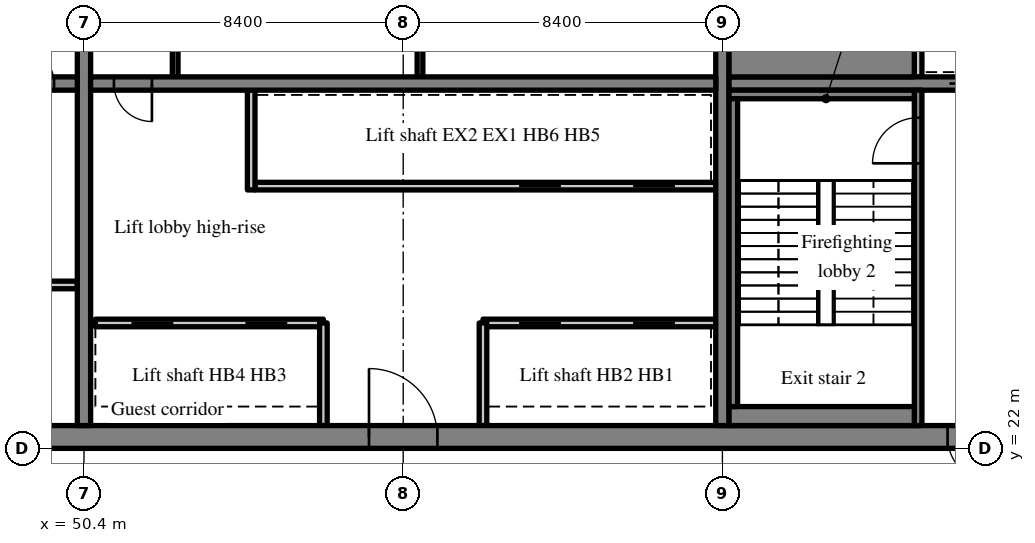
"""IFC4 building model, lengths in metres.
Left out: names, types, materials, properties, quantities, classifications, styles, units other than length and angle.
Written with IfcOpenShell. Run it as: python <this file> out.ifc"""

import sys

from ifc_helpers import new_model, si_unit, direction, frame, frame_2d, origin, place, context, subcontext, project, spatial, rectangle, extrude, source, transform, mapped, element, fill, save


model = new_model("IFC4")
c1 = context("Model", 3, precision=1e-05, world=origin(), true_north=direction((0.0, 1.0)))
c2 = subcontext(c1, "Body", "Model", "MODEL_VIEW")
j1 = project(units=[si_unit("LENGTHUNIT", "METRE"), si_unit("PLANEANGLEUNIT", "RADIAN")], contexts=[c1])
p1 = place(None, origin())
s1 = spatial("IfcSite", under=j1, at=p1, CompositionType="ELEMENT")
p2 = place(p1, origin())
s2 = spatial("IfcBuilding", under=s1, at=p2, CompositionType="ELEMENT")
p3 = place(p2, frame((0.0, 0.0, 256.9)))
s3 = spatial("IfcBuildingStorey", under=s2, at=p3, CompositionType="ELEMENT", Elevation=256.9)
m1 = source(origin(), c2, "Body", "SweptSolid", [
    extrude(rectangle(XDim=50.4, YDim=0.6, at=frame_2d((25.2, 0.0))), origin(), (0.0, 0.0, 1.0), 3.62),
])
p4 = place(p3, frame((25.2, 22.3, 0.0), z_axis=(0.0, 0.0, 1.0), x_axis=(1.0, 0.0, 0.0)))
e1 = element("IfcWall", 1, at=p4, inside=s3, PredefinedType="SHEAR", context=c2, shape_type="MappedRepresentation", body=[
    mapped(m1, transform((0.0, 0.0, 0.0), scale=1.0)),
])
m2 = source(origin(), c2, "Body", "SweptSolid", [
    extrude(rectangle(XDim=1.8, YDim=2.1, at=frame_2d((0.9, 1.05))), frame((0.0, 0.31, 0.0), z_axis=(0.0, -1.0, 0.0), x_axis=(1.0, 0.0, 0.0)), (0.0, 0.0, 1.0), 0.62),
])
p5 = place(p4, frame((15.9, 0.0, 0.0)))
e2 = element("IfcOpeningElement", 2, at=p5, cuts=e1, PredefinedType="OPENING", context=c2, shape_type="MappedRepresentation", body=[
    mapped(m2, transform((0.0, 0.0, 0.0), scale=1.0)),
])
m3 = source(origin(), c2, "Body", "SweptSolid", [
    extrude(rectangle(XDim=0.9, YDim=2.1, at=frame_2d((0.45, 1.05))), frame((0.0, 0.31, 0.0), z_axis=(0.0, -1.0, 0.0), x_axis=(1.0, 0.0, 0.0)), (0.0, 0.0, 1.0), 0.62),
])
p6 = place(p4, frame((21.513, 0.0, 0.0)))
e3 = element("IfcOpeningElement", 3, at=p6, cuts=e1, PredefinedType="OPENING", context=c2, shape_type="MappedRepresentation", body=[
    mapped(m3, transform((0.0, 0.0, 0.0), scale=1.0)),
])
p7 = place(p4, frame((32.7, 0.0, 0.0)))
e4 = element("IfcOpeningElement", 4, at=p7, cuts=e1, PredefinedType="OPENING", context=c2, shape_type="MappedRepresentation", body=[
    mapped(m2, transform((0.0, 0.0, 0.0), scale=1.0)),
])
m4 = source(origin(), c2, "Body", "SweptSolid", [
    extrude(rectangle(XDim=1.2, YDim=2.1, at=frame_2d((0.6, 1.05))), frame((0.0, 0.31, 0.0), z_axis=(0.0, -1.0, 0.0), x_axis=(1.0, 0.0, 0.0)), (0.0, 0.0, 1.0), 0.62),
])
p8 = place(p4, frame((6.488, 0.0, 0.0)))
e5 = element("IfcOpeningElement", 5, at=p8, cuts=e1, PredefinedType="OPENING", context=c2, shape_type="MappedRepresentation", body=[
    mapped(m4, transform((0.0, 0.0, 0.0), scale=1.0)),
])
p9 = place(p4, frame((47.925, 0.0, 0.0)))
e6 = element("IfcOpeningElement", 6, at=p9, cuts=e1, PredefinedType="OPENING", context=c2, shape_type="MappedRepresentation", body=[
    mapped(m4, transform((0.0, 0.0, 0.0), scale=1.0)),
])
m5 = source(origin(), c2, "Body", "SweptSolid", [
    extrude(rectangle(XDim=18.8, YDim=0.35, at=frame_2d((9.4, 0.0))), origin(), (0.0, 0.0, 1.0), 3.62),
])
p10 = place(p3, frame((50.4, 22.6, 0.0), z_axis=(0.0, 0.0, 1.0), x_axis=(0.0, 1.0, 0.0)))
e7 = element("IfcWall", 7, at=p10, inside=s3, PredefinedType="SHEAR", context=c2, shape_type="MappedRepresentation", body=[
    mapped(m5, transform((0.0, 0.0, 0.0), scale=1.0)),
])
m6 = source(origin(), c2, "Body", "SweptSolid", [
    extrude(rectangle(XDim=1.1, YDim=2.1, at=frame_2d((0.55, 1.05))), frame((0.0, 0.185, 0.0), z_axis=(0.0, -1.0, 0.0), x_axis=(1.0, 0.0, 0.0)), (0.0, 0.0, 1.0), 0.37),
])
p11 = place(p10, frame((12.85, 0.0, 0.0)))
e8 = element("IfcOpeningElement", 8, at=p11, cuts=e7, PredefinedType="OPENING", context=c2, shape_type="MappedRepresentation", body=[
    mapped(m6, transform((0.0, 0.0, 0.0), scale=1.0)),
])
p12 = place(p3, frame((67.2, 22.6, 0.0), z_axis=(0.0, 0.0, 1.0), x_axis=(0.0, 1.0, 0.0)))
e9 = element("IfcWall", 9, at=p12, inside=s3, PredefinedType="SHEAR", context=c2, shape_type="MappedRepresentation", body=[
    mapped(m5, transform((0.0, 0.0, 0.0), scale=1.0)),
])
m7 = source(origin(), c2, "Body", "SweptSolid", [
    extrude(rectangle(XDim=16.45, YDim=0.35, at=frame_2d((8.225, 0.0))), origin(), (0.0, 0.0, 1.0), 3.62),
])
p13 = place(p3, frame((33.775, 31.6, 0.0), z_axis=(0.0, 0.0, 1.0), x_axis=(1.0, 0.0, 0.0)))
e10 = element("IfcWall", 10, at=p13, inside=s3, PredefinedType="SHEAR", context=c2, shape_type="MappedRepresentation", body=[
    mapped(m7, transform((0.0, 0.0, 0.0), scale=1.0)),
])
m8 = source(origin(), c2, "Body", "SweptSolid", [
    extrude(rectangle(XDim=1.0, YDim=2.1, at=frame_2d((0.5, 1.05))), frame((0.0, 0.185, 0.0), z_axis=(0.0, -1.0, 0.0), x_axis=(1.0, 0.0, 0.0)), (0.0, 0.0, 1.0), 0.37),
])
p14 = place(p13, frame((14.837, 0.0, 0.0)))
e11 = element("IfcOpeningElement", 11, at=p14, cuts=e10, PredefinedType="OPENING", context=c2, shape_type="MappedRepresentation", body=[
    mapped(m8, transform((0.0, 0.0, 0.0), scale=1.0)),
])
m9 = source(origin(), c2, "Body", "SweptSolid", [
    extrude(rectangle(XDim=16.45, YDim=0.35, at=frame_2d((8.225, 0.0))), origin(), (0.0, 0.0, 1.0), 3.62),
])
p15 = place(p3, frame((50.575, 31.6, 0.0), z_axis=(0.0, 0.0, 1.0), x_axis=(1.0, 0.0, 0.0)))
e12 = element("IfcWall", 12, at=p15, inside=s3, PredefinedType="SHEAR", context=c2, shape_type="MappedRepresentation", body=[
    mapped(m9, transform((0.0, 0.0, 0.0), scale=1.0)),
])
p16 = place(p15, frame((0.613, 0.0, 0.0)))
e13 = element("IfcOpeningElement", 13, at=p16, cuts=e12, PredefinedType="OPENING", context=c2, shape_type="MappedRepresentation", body=[
    mapped(m8, transform((0.0, 0.0, 0.0), scale=1.0)),
])
m10 = source(origin(), c2, "Body", "SweptSolid", [
    extrude(rectangle(XDim=7.625, YDim=0.35, at=frame_2d((3.812, 0.0))), origin(), (0.0, 0.0, 1.0), 3.62),
])
p17 = place(p3, frame((67.375, 31.6, 0.0), z_axis=(0.0, 0.0, 1.0), x_axis=(1.0, 0.0, 0.0)))
e14 = element("IfcWall", 14, at=p17, inside=s3, PredefinedType="SHEAR", context=c2, shape_type="MappedRepresentation", body=[
    mapped(m10, transform((0.0, 0.0, 0.0), scale=1.0)),
])
p18 = place(p17, frame((5.8, 0.0, 0.0)))
e15 = element("IfcOpeningElement", 15, at=p18, cuts=e14, PredefinedType="OPENING", context=c2, shape_type="MappedRepresentation", body=[
    mapped(m6, transform((0.0, 0.0, 0.0), scale=1.0)),
])
m11 = source(origin(), c2, "Body", "SweptSolid", [
    extrude(rectangle(XDim=6.125, YDim=0.2, at=frame_2d((3.062, 0.0))), origin(), (0.0, 0.0, 1.0), 3.62),
])
p19 = place(p3, frame((44.1, 26.3, 0.0), z_axis=(0.0, 0.0, 1.0), x_axis=(1.0, 0.0, 0.0)))
e16 = element("IfcWall", 16, at=p19, inside=s3, PredefinedType="PARTITIONING", context=c2, shape_type="MappedRepresentation", body=[
    mapped(m11, transform((0.0, 0.0, 0.0), scale=1.0)),
])
p20 = place(p3, frame((67.025, 25.3, 0.0), z_axis=(0.0, 0.0, 1.0), x_axis=(-1.0, 0.0, 0.0)))
e17 = element("IfcWall", 17, at=p20, inside=s3, PredefinedType="SOLIDWALL", context=c2, shape_type="MappedRepresentation", body=[
    mapped(m11, transform((0.0, 0.0, 0.0), scale=1.0)),
])
m12 = source(origin(), c2, "Body", "SweptSolid", [
    extrude(rectangle(XDim=1.1, YDim=2.1, at=frame_2d((0.55, 1.05))), frame((0.0, 0.11, 0.0), z_axis=(0.0, -1.0, 0.0), x_axis=(1.0, 0.0, 0.0)), (0.0, 0.0, 1.0), 0.22),
])
p21 = place(p20, frame((1.075, 0.0, 0.0)))
e18 = element("IfcOpeningElement", 18, at=p21, cuts=e17, PredefinedType="OPENING", context=c2, shape_type="MappedRepresentation", body=[
    mapped(m12, transform((0.0, 0.0, 0.0), scale=1.0)),
])
p22 = place(p20, frame((4.075, 0.0, 0.0)))
e19 = element("IfcOpeningElement", 19, at=p22, cuts=e17, PredefinedType="OPENING", context=c2, shape_type="MappedRepresentation", body=[
    mapped(m12, transform((0.0, 0.0, 0.0), scale=1.0)),
])
m13 = source(origin(), c2, "Body", "SweptSolid", [
    extrude(rectangle(XDim=6.0, YDim=0.2, at=frame_2d((3.0, 0.0))), origin(), (0.0, 0.0, 1.0), 3.62),
])
p23 = place(p3, frame((56.7, 25.3, 0.0), z_axis=(0.0, 0.0, 1.0), x_axis=(-1.0, 0.0, 0.0)))
e20 = element("IfcWall", 20, at=p23, inside=s3, PredefinedType="SOLIDWALL", context=c2, shape_type="MappedRepresentation", body=[
    mapped(m13, transform((0.0, 0.0, 0.0), scale=1.0)),
])
p24 = place(p23, frame((0.95, 0.0, 0.0)))
e21 = element("IfcOpeningElement", 21, at=p24, cuts=e20, PredefinedType="OPENING", context=c2, shape_type="MappedRepresentation", body=[
    mapped(m12, transform((0.0, 0.0, 0.0), scale=1.0)),
])
p25 = place(p23, frame((3.95, 0.0, 0.0)))
e22 = element("IfcOpeningElement", 22, at=p25, cuts=e20, PredefinedType="OPENING", context=c2, shape_type="MappedRepresentation", body=[
    mapped(m12, transform((0.0, 0.0, 0.0), scale=1.0)),
])
m14 = source(origin(), c2, "Body", "SweptSolid", [
    extrude(rectangle(XDim=12.125, YDim=0.2, at=frame_2d((6.062, 0.0))), origin(), (0.0, 0.0, 1.0), 3.62),
])
p26 = place(p3, frame((67.025, 28.9, 0.0), z_axis=(0.0, 0.0, 1.0), x_axis=(-1.0, 0.0, 0.0)))
e23 = element("IfcWall", 23, at=p26, inside=s3, PredefinedType="SOLIDWALL", context=c2, shape_type="MappedRepresentation", body=[
    mapped(m14, transform((0.0, 0.0, 0.0), scale=1.0)),
])
p27 = place(p26, frame((1.075, 0.0, 0.0)))
e24 = element("IfcOpeningElement", 24, at=p27, cuts=e23, PredefinedType="OPENING", context=c2, shape_type="MappedRepresentation", body=[
    mapped(m12, transform((0.0, 0.0, 0.0), scale=1.0)),
])
p28 = place(p26, frame((4.075, 0.0, 0.0)))
e25 = element("IfcOpeningElement", 25, at=p28, cuts=e23, PredefinedType="OPENING", context=c2, shape_type="MappedRepresentation", body=[
    mapped(m12, transform((0.0, 0.0, 0.0), scale=1.0)),
])
m15 = source(origin(), c2, "Body", "SweptSolid", [
    extrude(rectangle(XDim=2.7, YDim=0.2, at=frame_2d((1.35, 0.0))), origin(), (0.0, 0.0, 1.0), 3.62),
])
for number, where, z_axis, x_axis in (
    (26, (60.9, 22.6, 0.0), (0.0, 0.0, 1.0), (0.0, 1.0, 0.0)),
    (27, (56.7, 22.6, 0.0), (0.0, 0.0, 1.0), (0.0, 1.0, 0.0)),
):
    element("IfcWall", number, at=place(p3, frame(where, z_axis=z_axis, x_axis=x_axis)), inside=s3, PredefinedType="SOLIDWALL", context=c2, shape_type="MappedRepresentation", body=[
        mapped(m15, transform((0.0, 0.0, 0.0), scale=1.0)),
    ])
m16 = source(origin(), c2, "Body", "SweptSolid", [
    extrude(rectangle(XDim=2.625, YDim=0.2, at=frame_2d((1.312, 0.0))), origin(), (0.0, 0.0, 1.0), 3.62),
])
p29 = place(p3, frame((54.8, 28.8, 0.0), z_axis=(0.0, 0.0, 1.0), x_axis=(0.0, 1.0, 0.0)))
e28 = element("IfcWall", 28, at=p29, inside=s3, PredefinedType="SOLIDWALL", context=c2, shape_type="MappedRepresentation", body=[
    mapped(m16, transform((0.0, 0.0, 0.0), scale=1.0)),
])
m17 = source(origin(), c2, "Body", "SweptSolid", [
    extrude(rectangle(XDim=3.225, YDim=0.15, at=frame_2d((1.613, 0.0))), origin(), (0.0, 0.0, 1.0), 3.62),
])
for number, where, z_axis, x_axis in (
    (29, (52.8, 31.775, 0.0), (0.0, 0.0, 1.0), (0.0, 1.0, 0.0)),
    (30, (59.242, 31.775, 0.0), (0.0, 0.0, 1.0), (0.0, 1.0, 0.0)),
):
    element("IfcWall", number, at=place(p3, frame(where, z_axis=z_axis, x_axis=x_axis)), inside=s3, PredefinedType="PARTITIONING", context=c2, shape_type="MappedRepresentation", body=[
        mapped(m17, transform((0.0, 0.0, 0.0), scale=1.0)),
    ])
m18 = source(origin(), c2, "Body", "SweptSolid", [
    extrude(rectangle(XDim=8.825, YDim=0.2, at=frame_2d((4.413, 0.0))), origin(), (0.0, 0.0, 1.0), 3.62),
])
p30 = place(p3, frame((72.35, 22.6, 0.0), z_axis=(0.0, 0.0, 1.0), x_axis=(0.0, 1.0, 0.0)))
e31 = element("IfcWall", 31, at=p30, inside=s3, PredefinedType="SOLIDWALL", context=c2, shape_type="MappedRepresentation", body=[
    mapped(m18, transform((0.0, 0.0, 0.0), scale=1.0)),
])
m19 = source(origin(), c2, "Body", "SweptSolid", [
    extrude(rectangle(XDim=1.2, YDim=2.1, at=frame_2d((0.6, 1.05))), frame((0.0, 0.11, 0.0), z_axis=(0.0, -1.0, 0.0), x_axis=(1.0, 0.0, 0.0)), (0.0, 0.0, 1.0), 0.22),
])
p31 = place(p30, frame((6.9, 0.0, 0.0)))
e32 = element("IfcOpeningElement", 32, at=p31, cuts=e31, PredefinedType="OPENING", context=c2, shape_type="MappedRepresentation", body=[
    mapped(m19, transform((0.0, 0.0, 0.0), scale=1.0)),
])
m20 = source(origin(), c2, "Body", "SweptSolid", [
    extrude(rectangle(XDim=1.825, YDim=0.2, at=frame_2d((0.913, 0.0))), origin(), (0.0, 0.0, 1.0), 3.62),
])
p32 = place(p3, frame((72.35, 31.775, 0.0), z_axis=(0.0, 0.0, 1.0), x_axis=(0.0, 1.0, 0.0)))
e33 = element("IfcWall", 33, at=p32, inside=s3, PredefinedType="SOLIDWALL", context=c2, shape_type="MappedRepresentation", body=[
    mapped(m20, transform((0.0, 0.0, 0.0), scale=1.0)),
])
m21 = source(origin(), c2, "Body", "SweptSolid", [
    extrude(rectangle(XDim=4.875, YDim=0.5, at=frame_2d((2.438, 0.0))), origin(), (0.0, 0.0, 1.0), 3.62),
])
p33 = place(p3, frame((67.375, 22.85, 0.0), z_axis=(0.0, 0.0, 1.0), x_axis=(1.0, 0.0, 0.0)))
e34 = element("IfcWall", 34, at=p33, inside=s3, PredefinedType="SOLIDWALL", context=c2, shape_type="MappedRepresentation", body=[
    mapped(m21, transform((0.0, 0.0, 0.0), scale=1.0)),
])
m22 = source(origin(), c2, "Body", "SweptSolid", [
    extrude(rectangle(XDim=4.875, YDim=0.225, at=frame_2d((2.438, 0.0))), origin(), (0.0, 0.0, 1.0), 3.62),
])
p34 = place(p3, frame((67.375, 31.312, 0.0), z_axis=(0.0, 0.0, 1.0), x_axis=(1.0, 0.0, 0.0)))
e35 = element("IfcWall", 35, at=p34, inside=s3, PredefinedType="SOLIDWALL", context=c2, shape_type="MappedRepresentation", body=[
    mapped(m22, transform((0.0, 0.0, 0.0), scale=1.0)),
])
m23 = source(origin(), c2, "Body", "SweptSolid", [
    extrude(rectangle(XDim=8.1, YDim=0.225, at=frame_2d((4.05, 0.0))), origin(), (0.0, 0.0, 1.0), 3.62),
])
p35 = place(p3, frame((67.487, 23.1, 0.0), z_axis=(0.0, 0.0, 1.0), x_axis=(0.0, 1.0, 0.0)))
e36 = element("IfcWall", 36, at=p35, inside=s3, PredefinedType="SOLIDWALL", context=c2, shape_type="MappedRepresentation", body=[
    mapped(m23, transform((0.0, 0.0, 0.0), scale=1.0)),
])
m24 = source(origin(), c2, "Body", "SweptSolid", [
    extrude(rectangle(XDim=4.875, YDim=1.025, at=frame_2d((2.438, 0.0))), origin(), (0.0, 0.0, 1.0), 3.62),
])
p36 = place(p3, frame((67.375, 32.287, 0.0), z_axis=(0.0, 0.0, 1.0), x_axis=(1.0, 0.0, 0.0)))
e37 = element("IfcWall", 37, at=p36, inside=s3, PredefinedType="SOLIDWALL", context=c2, shape_type="MappedRepresentation", body=[
    mapped(m24, transform((0.0, 0.0, 0.0), scale=1.0)),
])
m25 = source(origin(), c2, "Body", "SweptSolid", [
    extrude(rectangle(XDim=1.0, YDim=2.1, at=frame_2d((0.5, 1.05))), frame((0.0, 0.025, 0.0), z_axis=(0.0, -1.0, 0.0), x_axis=(1.0, 0.0, 0.0)), (0.0, 0.0, 1.0), 0.05),
])
p37 = place(p14, origin())
e38 = element("IfcDoor", 38, at=p37, inside=s3, OperationType="SINGLE_SWING_LEFT", PredefinedType="DOOR", context=c2, shape_type="MappedRepresentation", body=[
    mapped(m25, transform((0.0, 0.0, 0.0), scale=1.0)),
])
fill(e11, e38)
m26 = source(origin(), c2, "Body", "SweptSolid", [
    extrude(rectangle(XDim=1.8, YDim=2.1, at=frame_2d((0.9, 1.05))), frame((0.0, 0.225, 0.0), z_axis=(0.0, -1.0, 0.0), x_axis=(1.0, 0.0, 0.0)), (0.0, 0.0, 1.0), 0.05),
])
p38 = place(p7, origin())
e39 = element("IfcDoor", 39, at=p38, inside=s3, OperationType="DOUBLE_DOOR_SINGLE_SWING", PredefinedType="DOOR", context=c2, shape_type="MappedRepresentation", body=[
    mapped(m26, transform((0.0, 0.0, 0.0), scale=1.0)),
])
fill(e4, e39)
p39 = place(p16, origin())
e40 = element("IfcDoor", 40, at=p39, inside=s3, OperationType="SINGLE_SWING_RIGHT", PredefinedType="DOOR", context=c2, shape_type="MappedRepresentation", body=[
    mapped(m25, transform((0.0, 0.0, 0.0), scale=1.0)),
])
fill(e13, e40)
m27 = source(origin(), c2, "Body", "SweptSolid", [
    extrude(rectangle(XDim=1.1, YDim=2.1, at=frame_2d((0.55, 1.05))), frame((0.0, 0.025, 0.0), z_axis=(0.0, -1.0, 0.0), x_axis=(1.0, 0.0, 0.0)), (0.0, 0.0, 1.0), 0.05),
])
p40 = place(p21, origin())
e41 = element("IfcDoor", 41, at=p40, inside=s3, OperationType="SLIDING_TO_RIGHT", PredefinedType="DOOR", context=c2, shape_type="MappedRepresentation", body=[
    mapped(m27, transform((0.0, 0.0, 0.0), scale=1.0)),
])
fill(e18, e41)
p41 = place(p22, origin())
e42 = element("IfcDoor", 42, at=p41, inside=s3, OperationType="SLIDING_TO_LEFT", PredefinedType="DOOR", context=c2, shape_type="MappedRepresentation", body=[
    mapped(m27, transform((0.0, 0.0, 0.0), scale=1.0)),
])
fill(e19, e42)
p42 = place(p24, origin())
e43 = element("IfcDoor", 43, at=p42, inside=s3, OperationType="SLIDING_TO_RIGHT", PredefinedType="DOOR", context=c2, shape_type="MappedRepresentation", body=[
    mapped(m27, transform((0.0, 0.0, 0.0), scale=1.0)),
])
fill(e21, e43)
p43 = place(p25, origin())
e44 = element("IfcDoor", 44, at=p43, inside=s3, OperationType="SLIDING_TO_LEFT", PredefinedType="DOOR", context=c2, shape_type="MappedRepresentation", body=[
    mapped(m27, transform((0.0, 0.0, 0.0), scale=1.0)),
])
fill(e22, e44)
p44 = place(p27, origin())
e45 = element("IfcDoor", 45, at=p44, inside=s3, OperationType="SLIDING_TO_RIGHT", PredefinedType="DOOR", context=c2, shape_type="MappedRepresentation", body=[
    mapped(m27, transform((0.0, 0.0, 0.0), scale=1.0)),
])
fill(e24, e45)
p45 = place(p28, origin())
e46 = element("IfcDoor", 46, at=p45, inside=s3, OperationType="SLIDING_TO_LEFT", PredefinedType="DOOR", context=c2, shape_type="MappedRepresentation", body=[
    mapped(m27, transform((0.0, 0.0, 0.0), scale=1.0)),
])
fill(e25, e46)
m28 = source(origin(), c2, "Body", "SweptSolid", [
    extrude(rectangle(XDim=1.2, YDim=2.1, at=frame_2d((0.6, 1.05))), frame((0.0, 0.025, 0.0), z_axis=(0.0, -1.0, 0.0), x_axis=(1.0, 0.0, 0.0)), (0.0, 0.0, 1.0), 0.05),
])
p46 = place(p31, origin())
e47 = element("IfcDoor", 47, at=p46, inside=s3, OperationType="SINGLE_SWING_LEFT", PredefinedType="DOOR", context=c2, shape_type="MappedRepresentation", body=[
    mapped(m28, transform((0.0, 0.0, 0.0), scale=1.0)),
])
fill(e32, e47)
m29 = source(origin(), c2, "Body", "SweptSolid", [
    extrude(rectangle(XDim=1.2, YDim=2.1, at=frame_2d((0.6, 1.05))), frame((0.0, 0.225, 0.0), z_axis=(0.0, -1.0, 0.0), x_axis=(1.0, 0.0, 0.0)), (0.0, 0.0, 1.0), 0.05),
])
p47 = place(p9, origin())
e48 = element("IfcDoor", 48, at=p47, inside=s3, OperationType="SINGLE_SWING_RIGHT", PredefinedType="DOOR", context=c2, shape_type="MappedRepresentation", body=[
    mapped(m29, transform((0.0, 0.0, 0.0), scale=1.0)),
])
fill(e6, e48)
p48 = place(p18, origin())
e49 = element("IfcDoor", 49, at=p48, inside=s3, OperationType="SLIDING_TO_RIGHT", PredefinedType="DOOR", context=c2, shape_type="MappedRepresentation", body=[
    mapped(m27, transform((0.0, 0.0, 0.0), scale=1.0)),
])
fill(e15, e49)
save(model, sys.argv[1])
